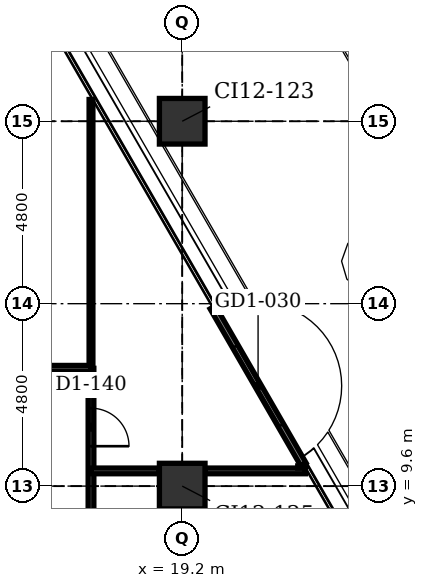
"""IFC4 building model, lengths in metres.
Left out: names, types, materials, properties, quantities, classifications, styles, units other than length and angle.
Written with IfcOpenShell. Run it as: python <this file> out.ifc"""

import sys

from ifc_helpers import new_model, si_unit, direction, frame, frame_2d, origin, origin_2d, place, context, subcontext, project, spatial, rectangle, extrude, element, fill, save


model = new_model("IFC4")
c1 = context("Model", 3, precision=1e-05, world=origin(), true_north=direction((0.0, 1.0)))
c2 = subcontext(c1, "Body", "Model", "MODEL_VIEW")
j1 = project(units=[si_unit("LENGTHUNIT", "METRE"), si_unit("PLANEANGLEUNIT", "RADIAN")], contexts=[c1])
p1 = place(None, origin())
s1 = spatial("IfcSite", under=j1, at=p1, CompositionType="ELEMENT")
p2 = place(p1, origin())
s2 = spatial("IfcBuilding", under=s1, at=p2, CompositionType="ELEMENT")
p3 = place(p2, frame((0.0, 0.0, 60.9)))
s3 = spatial("IfcBuildingStorey", under=s2, at=p3, CompositionType="ELEMENT", Elevation=60.9)
for number, where, z_axis, x_axis in (
    (1, (19.2, 9.6, -0.25), (0.0, 0.0, 1.0), (1.0, 0.0, 0.0)),
    (2, (19.2, 19.2, -0.25), (0.0, 0.0, 1.0), (1.0, 0.0, 0.0)),
):
    element("IfcColumn", number, at=place(p3, frame(where, z_axis=z_axis, x_axis=x_axis)), inside=s3, PredefinedType="COLUMN", context=c2, shape_type="SweptSolid", body=[
        extrude(rectangle(XDim=1.2, YDim=1.2, at=origin_2d()), origin(), (0.0, 0.0, 1.0), 5.45),
    ])
p4 = place(p3, frame((20.003, 14.304, 0.0), z_axis=(0.0, 0.0, 1.0), x_axis=(0.500007367075, -0.86602115036, 0.0)))
e3 = element("IfcWall", 3, at=p4, inside=s3, PredefinedType="PARTITIONING", context=c2, shape_type="SweptSolid", body=[
    extrude(rectangle(XDim=4.772, YDim=0.16, at=frame_2d((2.386, 0.0))), origin(), (0.0, 0.0, 1.0), 5.2),
])
p5 = place(p4, frame((1.186, 0.0, 0.0)))
e4 = element("IfcOpeningElement", 4, at=p5, cuts=e3, PredefinedType="OPENING", context=c2, shape_type="SweptSolid", body=[
    extrude(rectangle(XDim=2.4, YDim=2.4, at=frame_2d((1.2, 1.2))), frame((0.0, 0.09, 0.0), z_axis=(0.0, -1.0, 0.0), x_axis=(1.0, 0.0, 0.0)), (0.0, 0.0, 1.0), 0.18),
])
p6 = place(p3, frame((16.8, 12.7, 0.0), z_axis=(0.0, 0.0, 1.0), x_axis=(0.0, 1.0, 0.0)))
e5 = element("IfcWall", 5, at=p6, inside=s3, PredefinedType="PARTITIONING", context=c2, shape_type="SweptSolid", body=[
    extrude(rectangle(XDim=7.072, YDim=0.1, at=frame_2d((3.536, 0.0))), origin(), (0.0, 0.0, 1.0), 5.2),
])
p7 = place(p3, frame((16.8, 3.95, 0.0), z_axis=(0.0, 0.0, 1.0), x_axis=(0.0, 1.0, 0.0)))
e6 = element("IfcWall", 6, at=p7, inside=s3, PredefinedType="PARTITIONING", context=c2, shape_type="SweptSolid", body=[
    extrude(rectangle(XDim=8.75, YDim=0.15, at=frame_2d((4.375, 0.0))), origin(), (0.0, 0.0, 1.0), 5.2),
])
p8 = place(p7, frame((2.25, 0.0, 0.0)))
e7 = element("IfcOpeningElement", 7, at=p8, cuts=e6, PredefinedType="OPENING", context=c2, shape_type="SweptSolid", body=[
    extrude(rectangle(XDim=1.0, YDim=2.1, at=frame_2d((0.5, 1.05))), frame((0.0, 0.085, 0.0), z_axis=(0.0, -1.0, 0.0), x_axis=(1.0, 0.0, 0.0)), (0.0, 0.0, 1.0), 0.17),
])
p9 = place(p7, frame((6.7, 0.0, 0.0)))
e8 = element("IfcOpeningElement", 8, at=p9, cuts=e6, PredefinedType="OPENING", context=c2, shape_type="SweptSolid", body=[
    extrude(rectangle(XDim=1.0, YDim=2.1, at=frame_2d((0.5, 1.05))), frame((0.0, 0.085, 0.0), z_axis=(0.0, -1.0, 0.0), x_axis=(1.0, 0.0, 0.0)), (0.0, 0.0, 1.0), 0.17),
])
p10 = place(p3, frame((16.8, 10.0, 0.0), z_axis=(0.0, 0.0, 1.0), x_axis=(1.0, 0.0, 0.0)))
e9 = element("IfcWall", 9, at=p10, inside=s3, PredefinedType="PARTITIONING", context=c2, shape_type="SweptSolid", body=[
    extrude(rectangle(XDim=1.8, YDim=0.15, at=frame_2d((0.9, 0.0))), origin(), (0.0, 0.0, 1.0), 5.2),
])
p11 = place(p3, frame((19.8, 10.0, 0.0), z_axis=(0.0, 0.0, 1.0), x_axis=(1.0, 0.0, 0.0)))
e10 = element("IfcWall", 10, at=p11, inside=s3, PredefinedType="PARTITIONING", context=c2, shape_type="SweptSolid", body=[
    extrude(rectangle(XDim=2.642, YDim=0.15, at=frame_2d((1.321, 0.0))), origin(), (0.0, 0.0, 1.0), 5.2),
])
p12 = place(p3, frame((-16.8, 12.7, 0.0), z_axis=(0.0, 0.0, 1.0), x_axis=(1.0, 0.0, 0.0)))
e11 = element("IfcWall", 11, at=p12, inside=s3, PredefinedType="PARTITIONING", context=c2, shape_type="SweptSolid", body=[
    extrude(rectangle(XDim=33.6, YDim=0.15, at=frame_2d((16.8, 0.0))), origin(), (0.0, 0.0, 1.0), 5.2),
])
p13 = place(p12, frame((1.575, 0.0, 0.0)))
e12 = element("IfcOpeningElement", 12, at=p13, cuts=e11, PredefinedType="OPENING", context=c2, shape_type="SweptSolid", body=[
    extrude(rectangle(XDim=1.8, YDim=2.1, at=frame_2d((0.9, 1.05))), frame((0.0, 0.085, 0.0), z_axis=(0.0, -1.0, 0.0), x_axis=(1.0, 0.0, 0.0)), (0.0, 0.0, 1.0), 0.17),
])
p14 = place(p12, frame((9.1, 0.0, 0.0)))
e13 = element("IfcOpeningElement", 13, at=p14, cuts=e11, PredefinedType="OPENING", context=c2, shape_type="SweptSolid", body=[
    extrude(rectangle(XDim=1.0, YDim=2.1, at=frame_2d((0.5, 1.05))), frame((0.0, 0.085, 0.0), z_axis=(0.0, -1.0, 0.0), x_axis=(1.0, 0.0, 0.0)), (0.0, 0.0, 1.0), 0.17),
])
p15 = place(p12, frame((14.915, 0.0, 0.0)))
e14 = element("IfcOpeningElement", 14, at=p15, cuts=e11, PredefinedType="OPENING", context=c2, shape_type="SweptSolid", body=[
    extrude(rectangle(XDim=1.0, YDim=2.1, at=frame_2d((0.5, 1.05))), frame((0.0, 0.085, 0.0), z_axis=(0.0, -1.0, 0.0), x_axis=(1.0, 0.0, 0.0)), (0.0, 0.0, 1.0), 0.17),
])
p16 = place(p12, frame((17.325, 0.0, 0.0)))
e15 = element("IfcOpeningElement", 15, at=p16, cuts=e11, PredefinedType="OPENING", context=c2, shape_type="SweptSolid", body=[
    extrude(rectangle(XDim=1.8, YDim=2.1, at=frame_2d((0.9, 1.05))), frame((0.0, 0.085, 0.0), z_axis=(0.0, -1.0, 0.0), x_axis=(1.0, 0.0, 0.0)), (0.0, 0.0, 1.0), 0.17),
])
p17 = place(p12, frame((29.775, 0.0, 0.0)))
e16 = element("IfcOpeningElement", 16, at=p17, cuts=e11, PredefinedType="OPENING", context=c2, shape_type="SweptSolid", body=[
    extrude(rectangle(XDim=1.8, YDim=2.1, at=frame_2d((0.9, 1.05))), frame((0.0, 0.085, 0.0), z_axis=(0.0, -1.0, 0.0), x_axis=(1.0, 0.0, 0.0)), (0.0, 0.0, 1.0), 0.17),
])
p18 = place(p12, frame((23.55, 0.0, 0.0)))
e17 = element("IfcOpeningElement", 17, at=p18, cuts=e11, PredefinedType="OPENING", context=c2, shape_type="SweptSolid", body=[
    extrude(rectangle(XDim=0.9, YDim=2.1, at=frame_2d((0.45, 1.05))), frame((0.0, 0.085, 0.0), z_axis=(0.0, -1.0, 0.0), x_axis=(1.0, 0.0, 0.0)), (0.0, 0.0, 1.0), 0.17),
])
p19 = place(p12, frame((20.55, 0.0, 0.0)))
e18 = element("IfcOpeningElement", 18, at=p19, cuts=e11, PredefinedType="OPENING", context=c2, shape_type="SweptSolid", body=[
    extrude(rectangle(XDim=0.9, YDim=2.1, at=frame_2d((0.45, 1.05))), frame((0.0, 0.085, 0.0), z_axis=(0.0, -1.0, 0.0), x_axis=(1.0, 0.0, 0.0)), (0.0, 0.0, 1.0), 0.17),
])
p20 = place(p12, frame((4.6, 0.0, 0.9)))
e19 = element("IfcOpeningElement", 19, at=p20, cuts=e11, PredefinedType="OPENING", context=c2, shape_type="SweptSolid", body=[
    extrude(rectangle(XDim=1.8, YDim=1.5, at=frame_2d((0.9, 0.75))), frame((0.0, 0.085, 0.0), z_axis=(0.0, -1.0, 0.0), x_axis=(1.0, 0.0, 0.0)), (0.0, 0.0, 1.0), 0.17),
])
p21 = place(p3, frame((22.32, 10.132, 0.0), z_axis=(0.0, 0.0, 1.0), x_axis=(0.0, -1.0, 0.0)))
e20 = element("IfcWall", 20, at=p21, inside=s3, PredefinedType="PARTITIONING", context=c2, shape_type="SweptSolid", body=[
    extrude(rectangle(XDim=0.058, YDim=0.16, at=frame_2d((0.029, 0.0))), origin(), (0.0, 0.0, 1.0), 5.2),
])
p22 = place(p5, origin())
e21 = element("IfcDoor", 21, at=p22, inside=s3, OperationType="DOUBLE_DOOR_SLIDING", PredefinedType="DOOR", context=c2, shape_type="SweptSolid", body=[
    extrude(rectangle(XDim=2.4, YDim=2.4, at=frame_2d((1.2, 1.2))), frame((0.0, 0.025, 0.0), z_axis=(0.0, -1.0, 0.0), x_axis=(1.0, 0.0, 0.0)), (0.0, 0.0, 1.0), 0.05),
])
fill(e4, e21)
p23 = place(p9, frame((1.0, 0.0, 0.0), z_axis=(0.0, 0.0, 1.0), x_axis=(-1.0, 0.0, 0.0)))
e22 = element("IfcDoor", 22, at=p23, inside=s3, OperationType="SINGLE_SWING_LEFT", PredefinedType="DOOR", context=c2, shape_type="SweptSolid", body=[
    extrude(rectangle(XDim=1.0, YDim=2.1, at=frame_2d((0.5, 1.05))), frame((0.0, 0.025, 0.0), z_axis=(0.0, -1.0, 0.0), x_axis=(1.0, 0.0, 0.0)), (0.0, 0.0, 1.0), 0.05),
])
fill(e8, e22)
save(model, sys.argv[1])
